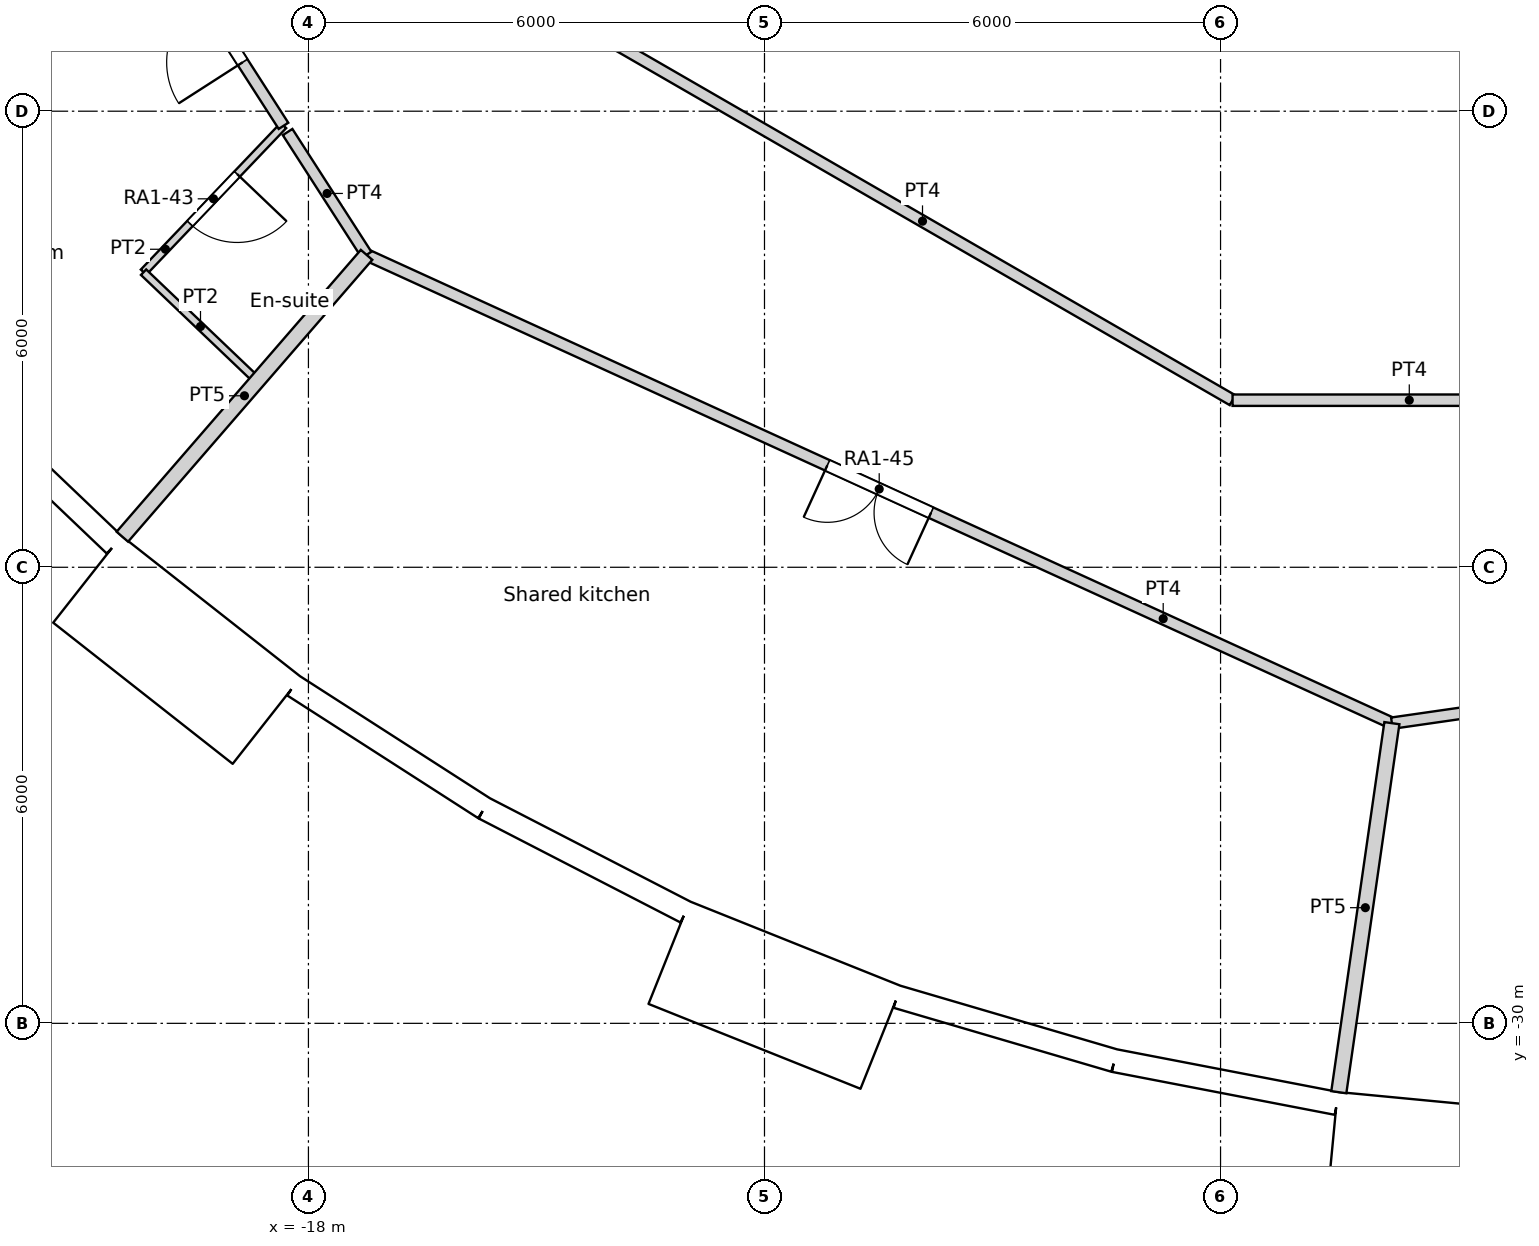
"""IFC4 building model, lengths in metres.
Left out: names, types, materials, properties, quantities, classifications, styles, units other than length and angle.
Written with IfcOpenShell. Run it as: python <this file> out.ifc"""

import sys

from ifc_helpers import new_model, si_unit, direction, frame, frame_2d, origin, origin_2d, place, context, subcontext, project, spatial, rectangle, circle, extrude, element, fill, save


model = new_model("IFC4")
c1 = context("Model", 3, precision=1e-05, world=origin(), true_north=direction((0.0, 1.0)))
c2 = subcontext(c1, "Body", "Model", "MODEL_VIEW")
j1 = project(units=[si_unit("LENGTHUNIT", "METRE"), si_unit("PLANEANGLEUNIT", "RADIAN")], contexts=[c1])
p1 = place(None, origin())
s1 = spatial("IfcSite", under=j1, at=p1, CompositionType="ELEMENT")
p2 = place(p1, origin())
s2 = spatial("IfcBuilding", under=s1, at=p2, CompositionType="ELEMENT")
p3 = place(p2, frame((0.0, 0.0, 28.2)))
s3 = spatial("IfcBuildingStorey", under=s2, at=p3, CompositionType="ELEMENT", Elevation=28.2)
for number, where, z_axis, x_axis in (
    (1, (-19.826, -22.88, 0.0), (0.0, 0.0, 1.0), (1.0, 0.0, 0.0)),
    (2, (-15.137, -26.219, 0.0), (0.0, 0.0, 1.0), (1.0, 0.0, 0.0)),
    (3, (-9.902, -28.61, 0.0), (0.0, 0.0, 1.0), (1.0, 0.0, 0.0)),
    (4, (-4.309, -29.966, 0.0), (0.0, 0.0, 1.0), (1.0, 0.0, 0.0)),
):
    element("IfcColumn", number, at=place(p3, frame(where, z_axis=z_axis, x_axis=x_axis)), inside=s3, PredefinedType="COLUMN", context=c2, shape_type="SweptSolid", body=[
        extrude(circle(Radius=0.7, at=origin_2d()), origin(), (0.0, 0.0, 1.0), 3.6),
    ])
for number, where, z_axis, x_axis in (
    (5, (-16.846, -17.855, 0.0), (0.0, 0.0, 1.0), (1.0, 0.0, 0.0)),
    (6, (-12.274, -21.259, 0.0), (0.0, 0.0, 1.0), (1.0, 0.0, 0.0)),
    (7, (-7.04, -23.516, 0.0), (0.0, 0.0, 1.0), (1.0, 0.0, 0.0)),
):
    element("IfcColumn", number, at=place(p3, frame(where, z_axis=z_axis, x_axis=x_axis)), inside=s3, PredefinedType="COLUMN", context=c2, shape_type="SweptSolid", body=[
        extrude(circle(Radius=0.75, at=origin_2d()), origin(), (0.0, 0.0, 1.0), 3.6),
    ])
p4 = place(p3, frame((-4.188, -18.35, 0.0), z_axis=(0.0, 0.0, 1.0), x_axis=(1.0, 0.0, 0.0)))
e8 = element("IfcColumn", 8, at=p4, inside=s3, PredefinedType="COLUMN", context=c2, shape_type="SweptSolid", body=[
    extrude(circle(Radius=0.8, at=origin_2d()), origin(), (0.0, 0.0, 1.0), 3.6),
])
p5 = place(p3, frame((-22.707, -21.651, 0.0), z_axis=(0.0, 0.0, 1.0), x_axis=(0.723744206617, -0.690068346896, 0.0)))
e9 = element("IfcWall", 9, at=p5, inside=s3, PredefinedType="SOLIDWALL", context=c2, shape_type="SweptSolid", body=[
    extrude(rectangle(XDim=2.98, YDim=0.3, at=frame_2d((1.49, 0.0))), origin(), (0.0, 0.0, 1.0), 3.15),
])
p6 = place(p5, frame((1.49, 0.0, 1.55)))
e10 = element("IfcOpeningElement", 10, at=p6, cuts=e9, PredefinedType="OPENING", context=c2, shape_type="SweptSolid", body=[
    extrude(circle(Radius=0.9, at=origin_2d()), frame((0.0, 0.16, 0.0), z_axis=(0.0, -1.0, 0.0), x_axis=(1.0, 0.0, 0.0)), (0.0, 0.0, 1.0), 0.32),
])
p7 = place(p3, frame((-20.907, -24.159, -0.45), z_axis=(0.0, 0.0, 1.0), x_axis=(0.786049992888, -0.618162930529, 0.0)))
e11 = element("IfcWall", 11, at=p7, inside=s3, PredefinedType="ELEMENTEDWALL", context=c2, shape_type="SweptSolid", body=[
    extrude(rectangle(XDim=3.0, YDim=1.45, at=frame_2d((1.5, 0.0))), origin(), (0.0, 0.0, 1.0), 3.6),
])
p8 = place(p7, frame((1.5, 0.0, 2.0)))
e12 = element("IfcOpeningElement", 12, at=p8, cuts=e11, PredefinedType="OPENING", context=c2, shape_type="SweptSolid", body=[
    extrude(circle(Radius=0.9, at=origin_2d()), frame((0.0, 0.735, 0.0), z_axis=(0.0, -1.0, 0.0), x_axis=(1.0, 0.0, 0.0)), (0.0, 0.0, 1.0), 1.47),
])
p9 = place(p3, frame((-18.194, -25.56, 0.0), z_axis=(0.0, 0.0, 1.0), x_axis=(0.84122372879, -0.540687190639, 0.0)))
e13 = element("IfcWall", 13, at=p9, inside=s3, PredefinedType="SOLIDWALL", context=c2, shape_type="SweptSolid", body=[
    extrude(rectangle(XDim=2.98, YDim=0.3, at=frame_2d((1.49, 0.0))), origin(), (0.0, 0.0, 1.0), 3.15),
])
p10 = place(p9, frame((1.49, 0.0, 1.55)))
e14 = element("IfcOpeningElement", 14, at=p10, cuts=e13, PredefinedType="OPENING", context=c2, shape_type="SweptSolid", body=[
    extrude(circle(Radius=0.9, at=origin_2d()), frame((0.0, 0.16, 0.0), z_axis=(0.0, -1.0, 0.0), x_axis=(1.0, 0.0, 0.0)), (0.0, 0.0, 1.0), 0.32),
])
p11 = place(p3, frame((-15.687, -27.171, 0.0), z_axis=(0.0, 0.0, 1.0), x_axis=(0.888853225096, -0.4581920386, 0.0)))
e15 = element("IfcWall", 15, at=p11, inside=s3, PredefinedType="SOLIDWALL", context=c2, shape_type="SweptSolid", body=[
    extrude(rectangle(XDim=2.979, YDim=0.3, at=frame_2d((1.49, 0.0))), origin(), (0.0, 0.0, 1.0), 3.15),
])
p12 = place(p11, frame((1.49, 0.0, 1.55)))
e16 = element("IfcOpeningElement", 16, at=p12, cuts=e15, PredefinedType="OPENING", context=c2, shape_type="SweptSolid", body=[
    extrude(circle(Radius=0.9, at=origin_2d()), frame((0.0, 0.16, 0.0), z_axis=(0.0, -1.0, 0.0), x_axis=(1.0, 0.0, 0.0)), (0.0, 0.0, 1.0), 0.32),
])
p13 = place(p3, frame((-13.254, -29.07, -0.45), z_axis=(0.0, 0.0, 1.0), x_axis=(0.928358776184, -0.371685327504, 0.0)))
e17 = element("IfcWall", 17, at=p13, inside=s3, PredefinedType="ELEMENTEDWALL", context=c2, shape_type="SweptSolid", body=[
    extrude(rectangle(XDim=3.0, YDim=1.45, at=frame_2d((1.5, 0.0))), origin(), (0.0, 0.0, 1.0), 3.6),
])
p14 = place(p13, frame((1.5, 0.0, 2.0)))
e18 = element("IfcOpeningElement", 18, at=p14, cuts=e17, PredefinedType="OPENING", context=c2, shape_type="SweptSolid", body=[
    extrude(circle(Radius=0.9, at=origin_2d()), frame((0.0, 0.735, 0.0), z_axis=(0.0, -1.0, 0.0), x_axis=(1.0, 0.0, 0.0)), (0.0, 0.0, 1.0), 1.47),
])
p15 = place(p3, frame((-10.256, -29.651, 0.0), z_axis=(0.0, 0.0, 1.0), x_axis=(0.959507586834, -0.28168278401, 0.0)))
e19 = element("IfcWall", 19, at=p15, inside=s3, PredefinedType="SOLIDWALL", context=c2, shape_type="SweptSolid", body=[
    extrude(rectangle(XDim=2.98, YDim=0.3, at=frame_2d((1.49, 0.0))), origin(), (0.0, 0.0, 1.0), 3.15),
])
p16 = place(p15, frame((1.49, 0.0, 1.55)))
e20 = element("IfcOpeningElement", 20, at=p16, cuts=e19, PredefinedType="OPENING", context=c2, shape_type="SweptSolid", body=[
    extrude(circle(Radius=0.9, at=origin_2d()), frame((0.0, 0.16, 0.0), z_axis=(0.0, -1.0, 0.0), x_axis=(1.0, 0.0, 0.0)), (0.0, 0.0, 1.0), 0.32),
])
p17 = place(p3, frame((-7.397, -30.49, 0.0), z_axis=(0.0, 0.0, 1.0), x_axis=(0.981924535406, -0.189272836848, 0.0)))
e21 = element("IfcWall", 21, at=p17, inside=s3, PredefinedType="SOLIDWALL", context=c2, shape_type="SweptSolid", body=[
    extrude(rectangle(XDim=2.98, YDim=0.3, at=frame_2d((1.49, 0.0))), origin(), (0.0, 0.0, 1.0), 3.15),
])
p18 = place(p17, frame((1.49, 0.0, 1.55)))
e22 = element("IfcOpeningElement", 22, at=p18, cuts=e21, PredefinedType="OPENING", context=c2, shape_type="SweptSolid", body=[
    extrude(circle(Radius=0.9, at=origin_2d()), frame((0.0, 0.16, 0.0), z_axis=(0.0, -1.0, 0.0), x_axis=(1.0, 0.0, 0.0)), (0.0, 0.0, 1.0), 0.32),
])
p19 = place(p3, frame((-4.527, -31.627, -0.45), z_axis=(0.0, 0.0, 1.0), x_axis=(0.995472768558, -0.09504718333, 0.0)))
e23 = element("IfcWall", 23, at=p19, inside=s3, PredefinedType="ELEMENTEDWALL", context=c2, shape_type="SweptSolid", body=[
    extrude(rectangle(XDim=3.0, YDim=1.45, at=frame_2d((1.5, 0.0))), origin(), (0.0, 0.0, 1.0), 3.6),
])
p20 = place(p19, frame((1.5, 0.0, 2.0)))
e24 = element("IfcOpeningElement", 24, at=p20, cuts=e23, PredefinedType="OPENING", context=c2, shape_type="SweptSolid", body=[
    extrude(circle(Radius=0.9, at=origin_2d()), frame((0.0, 0.735, 0.0), z_axis=(0.0, -1.0, 0.0), x_axis=(1.0, 0.0, 0.0)), (0.0, 0.0, 1.0), 1.47),
])
p21 = place(p3, frame((-25.252, -7.415, 0.0), z_axis=(0.0, 0.0, 1.0), x_axis=(0.540498462047, -0.84134500208, 0.0)))
e25 = element("IfcWall", 25, at=p21, inside=s3, PredefinedType="PARTITIONING", context=c2, shape_type="SweptSolid", body=[
    extrude(rectangle(XDim=12.811, YDim=0.15, at=frame_2d((6.405, 0.0))), origin(), (0.0, 0.0, 1.0), 3.15),
])
p22 = place(p21, frame((3.013, 0.0, 0.0)))
e26 = element("IfcOpeningElement", 26, at=p22, cuts=e25, PredefinedType="OPENING", context=c2, shape_type="SweptSolid", body=[
    extrude(rectangle(XDim=1.0, YDim=2.1, at=frame_2d((0.5, 1.05))), frame((0.0, 0.075, 0.0), z_axis=(0.0, -1.0, 0.0), x_axis=(1.0, 0.0, 0.0)), (0.0, 0.0, 1.0), 0.15),
])
p23 = place(p21, frame((5.452, 0.0, 0.0)))
e27 = element("IfcOpeningElement", 27, at=p23, cuts=e25, PredefinedType="OPENING", context=c2, shape_type="SweptSolid", body=[
    extrude(rectangle(XDim=1.0, YDim=2.1, at=frame_2d((0.5, 1.05))), frame((0.0, 0.075, 0.0), z_axis=(0.0, -1.0, 0.0), x_axis=(1.0, 0.0, 0.0)), (0.0, 0.0, 1.0), 0.15),
])
p24 = place(p21, frame((10.817, 0.0, 0.0)))
e28 = element("IfcOpeningElement", 28, at=p24, cuts=e25, PredefinedType="OPENING", context=c2, shape_type="SweptSolid", body=[
    extrude(rectangle(XDim=1.0, YDim=2.1, at=frame_2d((0.5, 1.05))), frame((0.0, 0.075, 0.0), z_axis=(0.0, -1.0, 0.0), x_axis=(1.0, 0.0, 0.0)), (0.0, 0.0, 1.0), 0.15),
])
p25 = place(p3, frame((-14.0, -17.092, 0.0), z_axis=(0.0, 0.0, 1.0), x_axis=(0.86602719091, -0.499996904595, 0.0)))
e29 = element("IfcWall", 29, at=p25, inside=s3, PredefinedType="PARTITIONING", context=c2, shape_type="SweptSolid", body=[
    extrude(rectangle(XDim=9.42, YDim=0.15, at=frame_2d((4.71, 0.0))), origin(), (0.0, 0.0, 1.0), 3.15),
])
p26 = place(p3, frame((-5.842, -21.802, 0.0), z_axis=(0.0, 0.0, 1.0), x_axis=(1.0, 0.0, 0.0)))
e30 = element("IfcWall", 30, at=p26, inside=s3, PredefinedType="PARTITIONING", context=c2, shape_type="SweptSolid", body=[
    extrude(rectangle(XDim=4.65, YDim=0.15, at=frame_2d((2.325, 0.0))), origin(), (0.0, 0.0, 1.0), 3.15),
])
p27 = place(p3, frame((-18.274, -18.274, 0.0), z_axis=(0.0, 0.0, 1.0), x_axis=(0.540751168176, -0.841182604502, 0.0)))
e31 = element("IfcWall", 31, at=p27, inside=s3, PredefinedType="PARTITIONING", context=c2, shape_type="SweptSolid", body=[
    extrude(rectangle(XDim=1.921, YDim=0.15, at=frame_2d((0.96, 0.0))), origin(), (0.0, 0.0, 1.0), 3.15),
])
p28 = place(p3, frame((-17.235, -19.89, 0.0), z_axis=(0.0, 0.0, 1.0), x_axis=(0.90960889055, -0.415465601743, 0.0)))
e32 = element("IfcWall", 32, at=p28, inside=s3, PredefinedType="PARTITIONING", context=c2, shape_type="SweptSolid", body=[
    extrude(rectangle(XDim=14.829, YDim=0.15, at=frame_2d((7.415, 0.0))), origin(), (0.0, 0.0, 1.0), 3.15),
])
p29 = place(p28, frame((6.664, 0.0, 0.0)))
e33 = element("IfcOpeningElement", 33, at=p29, cuts=e32, PredefinedType="OPENING", context=c2, shape_type="SweptSolid", body=[
    extrude(rectangle(XDim=1.5, YDim=2.1, at=frame_2d((0.75, 1.05))), frame((0.0, 0.075, 0.0), z_axis=(0.0, -1.0, 0.0), x_axis=(1.0, 0.0, 0.0)), (0.0, 0.0, 1.0), 0.15),
])
p30 = place(p3, frame((-3.746, -26.051, 0.0), z_axis=(0.0, 0.0, 1.0), x_axis=(0.989823328782, 0.142301713967, 0.0)))
e34 = element("IfcWall", 34, at=p30, inside=s3, PredefinedType="PARTITIONING", context=c2, shape_type="SweptSolid", body=[
    extrude(rectangle(XDim=14.83, YDim=0.15, at=frame_2d((7.415, 0.0))), origin(), (0.0, 0.0, 1.0), 3.15),
])
p31 = place(p30, frame((4.015, 0.0, 0.0)))
e35 = element("IfcOpeningElement", 35, at=p31, cuts=e34, PredefinedType="OPENING", context=c2, shape_type="SweptSolid", body=[
    extrude(rectangle(XDim=1.8, YDim=2.1, at=frame_2d((0.9, 1.05))), frame((0.0, 0.075, 0.0), z_axis=(0.0, -1.0, 0.0), x_axis=(1.0, 0.0, 0.0)), (0.0, 0.0, 1.0), 0.15),
])
p32 = place(p3, frame((-24.544, -19.302, 0.0), z_axis=(0.0, 0.0, 1.0), x_axis=(0.78597832915, 0.618254046576, 0.0)))
e36 = element("IfcWall", 36, at=p32, inside=s3, PredefinedType="PARTITIONING", context=c2, shape_type="SweptSolid", body=[
    extrude(rectangle(XDim=5.857, YDim=0.15, at=frame_2d((2.929, 0.0))), origin(), (0.0, 0.0, 1.0), 3.15),
])
p33 = place(p3, frame((-20.169, -20.118, 0.0), z_axis=(0.0, 0.0, 1.0), x_axis=(0.690011756227, 0.723798159896, 0.0)))
e37 = element("IfcWall", 37, at=p33, inside=s3, PredefinedType="PARTITIONING", context=c2, shape_type="SweptSolid", body=[
    extrude(rectangle(XDim=2.667, YDim=0.1, at=frame_2d((1.333, 0.0))), origin(), (0.0, 0.0, 1.0), 3.15),
])
p34 = place(p33, frame((0.884, 0.0, 0.0)))
e38 = element("IfcOpeningElement", 38, at=p34, cuts=e37, PredefinedType="OPENING", context=c2, shape_type="SweptSolid", body=[
    extrude(rectangle(XDim=0.9, YDim=2.04, at=frame_2d((0.45, 1.02))), frame((0.0, 0.05, 0.0), z_axis=(0.0, -1.0, 0.0), x_axis=(1.0, 0.0, 0.0)), (0.0, 0.0, 1.0), 0.1),
])
p35 = place(p3, frame((-20.169, -20.118, 0.0), z_axis=(0.0, 0.0, 1.0), x_axis=(0.723537557066, -0.690285016145, 0.0)))
e39 = element("IfcWall", 39, at=p35, inside=s3, PredefinedType="PARTITIONING", context=c2, shape_type="SweptSolid", body=[
    extrude(rectangle(XDim=2.071, YDim=0.1, at=frame_2d((1.035, 0.0))), origin(), (0.0, 0.0, 1.0), 3.15),
])
p36 = place(p3, frame((-20.448, -23.598, 0.0), z_axis=(0.0, 0.0, 1.0), x_axis=(0.654847179409, 0.755761319214, 0.0)))
e40 = element("IfcWall", 40, at=p36, inside=s3, PredefinedType="PARTITIONING", context=c2, shape_type="SweptSolid", body=[
    extrude(rectangle(XDim=4.906, YDim=0.2, at=frame_2d((2.453, 0.0))), origin(), (0.0, 0.0, 1.0), 3.15),
])
p37 = place(p3, frame((-4.444, -30.906, 0.0), z_axis=(0.0, 0.0, 1.0), x_axis=(0.142306296561, 0.989822669956, 0.0)))
e41 = element("IfcWall", 41, at=p37, inside=s3, PredefinedType="PARTITIONING", context=c2, shape_type="SweptSolid", body=[
    extrude(rectangle(XDim=4.905, YDim=0.2, at=frame_2d((2.452, 0.0))), origin(), (0.0, 0.0, 1.0), 3.15),
])
p38 = place(p6, origin())
e42 = element("IfcWindow", 42, at=p38, inside=s3, PartitioningType="SINGLE_PANEL", PredefinedType="WINDOW", context=c2, shape_type="SweptSolid", body=[
    extrude(circle(Radius=0.9, at=origin_2d()), frame((0.0, 0.12, 0.0), z_axis=(0.0, -1.0, 0.0), x_axis=(1.0, 0.0, 0.0)), (0.0, 0.0, 1.0), 0.1),
])
fill(e10, e42)
p39 = place(p8, origin())
e43 = element("IfcWindow", 43, at=p39, inside=s3, PartitioningType="SINGLE_PANEL", PredefinedType="WINDOW", context=c2, shape_type="SweptSolid", body=[
    extrude(circle(Radius=0.9, at=origin_2d()), frame((0.0, 0.695, 0.0), z_axis=(0.0, -1.0, 0.0), x_axis=(1.0, 0.0, 0.0)), (0.0, 0.0, 1.0), 0.1),
])
fill(e12, e43)
p40 = place(p10, origin())
e44 = element("IfcWindow", 44, at=p40, inside=s3, PartitioningType="SINGLE_PANEL", PredefinedType="WINDOW", context=c2, shape_type="SweptSolid", body=[
    extrude(circle(Radius=0.9, at=origin_2d()), frame((0.0, 0.12, 0.0), z_axis=(0.0, -1.0, 0.0), x_axis=(1.0, 0.0, 0.0)), (0.0, 0.0, 1.0), 0.1),
])
fill(e14, e44)
p41 = place(p12, origin())
e45 = element("IfcWindow", 45, at=p41, inside=s3, PartitioningType="SINGLE_PANEL", PredefinedType="WINDOW", context=c2, shape_type="SweptSolid", body=[
    extrude(circle(Radius=0.9, at=origin_2d()), frame((0.0, 0.12, 0.0), z_axis=(0.0, -1.0, 0.0), x_axis=(1.0, 0.0, 0.0)), (0.0, 0.0, 1.0), 0.1),
])
fill(e16, e45)
p42 = place(p14, origin())
e46 = element("IfcWindow", 46, at=p42, inside=s3, PartitioningType="SINGLE_PANEL", PredefinedType="WINDOW", context=c2, shape_type="SweptSolid", body=[
    extrude(circle(Radius=0.9, at=origin_2d()), frame((0.0, 0.695, 0.0), z_axis=(0.0, -1.0, 0.0), x_axis=(1.0, 0.0, 0.0)), (0.0, 0.0, 1.0), 0.1),
])
fill(e18, e46)
p43 = place(p16, origin())
e47 = element("IfcWindow", 47, at=p43, inside=s3, PartitioningType="SINGLE_PANEL", PredefinedType="WINDOW", context=c2, shape_type="SweptSolid", body=[
    extrude(circle(Radius=0.9, at=origin_2d()), frame((0.0, 0.12, 0.0), z_axis=(0.0, -1.0, 0.0), x_axis=(1.0, 0.0, 0.0)), (0.0, 0.0, 1.0), 0.1),
])
fill(e20, e47)
p44 = place(p18, origin())
e48 = element("IfcWindow", 48, at=p44, inside=s3, PartitioningType="SINGLE_PANEL", PredefinedType="WINDOW", context=c2, shape_type="SweptSolid", body=[
    extrude(circle(Radius=0.9, at=origin_2d()), frame((0.0, 0.12, 0.0), z_axis=(0.0, -1.0, 0.0), x_axis=(1.0, 0.0, 0.0)), (0.0, 0.0, 1.0), 0.1),
])
fill(e22, e48)
p45 = place(p20, origin())
e49 = element("IfcWindow", 49, at=p45, inside=s3, PartitioningType="SINGLE_PANEL", PredefinedType="WINDOW", context=c2, shape_type="SweptSolid", body=[
    extrude(circle(Radius=0.9, at=origin_2d()), frame((0.0, 0.695, 0.0), z_axis=(0.0, -1.0, 0.0), x_axis=(1.0, 0.0, 0.0)), (0.0, 0.0, 1.0), 0.1),
])
fill(e24, e49)
p46 = place(p34, origin())
e50 = element("IfcDoor", 50, at=p46, inside=s3, OperationType="SINGLE_SWING_LEFT", PredefinedType="DOOR", context=c2, shape_type="SweptSolid", body=[
    extrude(rectangle(XDim=0.9, YDim=2.04, at=frame_2d((0.45, 1.02))), frame((0.0, 0.025, 0.0), z_axis=(0.0, -1.0, 0.0), x_axis=(1.0, 0.0, 0.0)), (0.0, 0.0, 1.0), 0.05),
])
fill(e38, e50)
p47 = place(p24, origin())
e51 = element("IfcDoor", 51, at=p47, inside=s3, OperationType="SINGLE_SWING_LEFT", PredefinedType="DOOR", context=c2, shape_type="SweptSolid", body=[
    extrude(rectangle(XDim=1.0, YDim=2.1, at=frame_2d((0.5, 1.05))), frame((0.0, 0.025, 0.0), z_axis=(0.0, -1.0, 0.0), x_axis=(1.0, 0.0, 0.0)), (0.0, 0.0, 1.0), 0.05),
])
fill(e28, e51)
p48 = place(p29, origin())
e52 = element("IfcDoor", 52, at=p48, inside=s3, OperationType="DOUBLE_DOOR_SINGLE_SWING", PredefinedType="DOOR", context=c2, shape_type="SweptSolid", body=[
    extrude(rectangle(XDim=1.5, YDim=2.1, at=frame_2d((0.75, 1.05))), frame((0.0, 0.025, 0.0), z_axis=(0.0, -1.0, 0.0), x_axis=(1.0, 0.0, 0.0)), (0.0, 0.0, 1.0), 0.05),
])
fill(e33, e52)
save(model, sys.argv[1])
